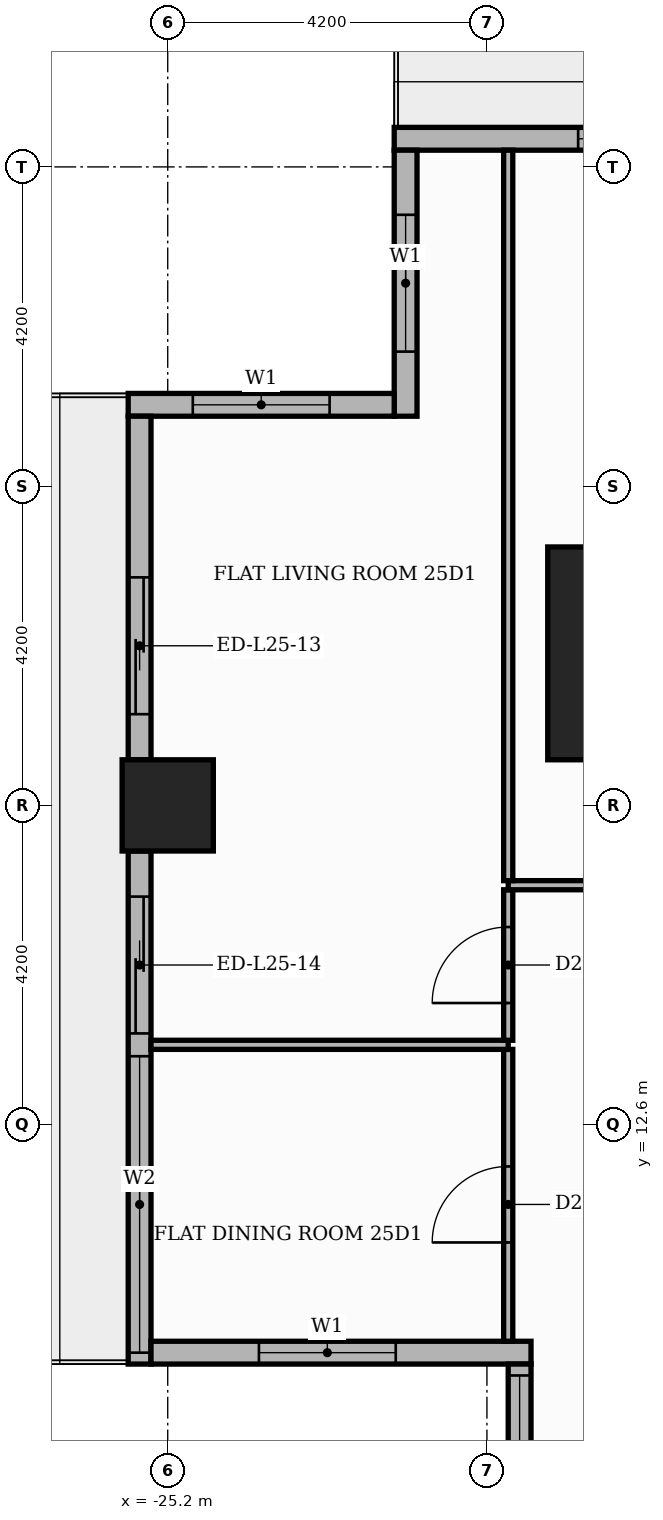
"""IFC4 building model, lengths in metres.
Left out: names, types, materials, properties, quantities, classifications, styles, units other than length and angle.
Written with IfcOpenShell. Run it as: python <this file> out.ifc"""

import sys

from ifc_helpers import new_model, si_unit, direction, frame, frame_2d, origin, origin_2d, place, context, subcontext, project, spatial, rectangle, extrude, element, fill, save


model = new_model("IFC4")
c1 = context("Model", 3, precision=1e-05, world=origin(), true_north=direction((0.0, 1.0)))
c2 = subcontext(c1, "Body", "Model", "MODEL_VIEW")
j1 = project(units=[si_unit("LENGTHUNIT", "METRE"), si_unit("PLANEANGLEUNIT", "RADIAN")], contexts=[c1])
p1 = place(None, origin())
s1 = spatial("IfcSite", under=j1, at=p1, CompositionType="ELEMENT")
p2 = place(p1, origin())
s2 = spatial("IfcBuilding", under=s1, at=p2, CompositionType="ELEMENT")
p3 = place(p2, frame((0.0, 0.0, 106.5)))
s3 = spatial("IfcBuildingStorey", under=s2, at=p3, CompositionType="ELEMENT", Elevation=106.5)
p4 = place(p3, frame((-18.8, 18.8, 0.0), z_axis=(0.0, 0.0, 1.0), x_axis=(1.0, 0.0, 0.0)))
e1 = element("IfcColumn", 1, at=p4, inside=s3, PredefinedType="COLUMN", context=c2, shape_type="SweptSolid", body=[
    extrude(rectangle(XDim=2.8, YDim=2.8, at=origin_2d()), origin(), (0.0, 0.0, 1.0), 3.9),
])
p5 = place(p3, frame((-25.2, 16.8, 0.0), z_axis=(0.0, 0.0, 1.0), x_axis=(1.0, 0.0, 0.0)))
e2 = element("IfcColumn", 2, at=p5, inside=s3, PredefinedType="COLUMN", context=c2, shape_type="SweptSolid", body=[
    extrude(rectangle(XDim=1.2, YDim=1.2, at=origin_2d()), origin(), (0.0, 0.0, 1.0), 3.9),
])
p6 = place(p3, frame((-17.4, 25.57, 0.0), z_axis=(0.0, 0.0, 1.0), x_axis=(-1.0, 0.0, 0.0)))
e3 = element("IfcWall", 3, at=p6, inside=s3, PredefinedType="STANDARD", context=c2, shape_type="SweptSolid", body=[
    extrude(rectangle(XDim=4.82, YDim=0.3, at=frame_2d((2.41, 0.0))), origin(), (0.0, 0.0, 1.0), 3.48),
])
p7 = place(p6, frame((0.6, 0.0, 0.9)))
e4 = element("IfcOpeningElement", 4, at=p7, cuts=e3, PredefinedType="OPENING", context=c2, shape_type="SweptSolid", body=[
    extrude(rectangle(XDim=1.8, YDim=2.1, at=frame_2d((0.9, 1.05))), frame((0.0, 0.16, 0.0), z_axis=(0.0, -1.0, 0.0), x_axis=(1.0, 0.0, 0.0)), (0.0, 0.0, 1.0), 0.32),
])
p8 = place(p3, frame((-22.07, 25.42, 0.0), z_axis=(0.0, 0.0, 1.0), x_axis=(0.0, -1.0, 0.0)))
e5 = element("IfcWall", 5, at=p8, inside=s3, PredefinedType="STANDARD", context=c2, shape_type="SweptSolid", body=[
    extrude(rectangle(XDim=3.5, YDim=0.3, at=frame_2d((1.75, 0.0))), origin(), (0.0, 0.0, 1.0), 3.48),
])
p9 = place(p8, frame((0.85, 0.0, 0.9)))
e6 = element("IfcOpeningElement", 6, at=p9, cuts=e5, PredefinedType="OPENING", context=c2, shape_type="SweptSolid", body=[
    extrude(rectangle(XDim=1.8, YDim=2.1, at=frame_2d((0.9, 1.05))), frame((0.0, 0.16, 0.0), z_axis=(0.0, -1.0, 0.0), x_axis=(1.0, 0.0, 0.0)), (0.0, 0.0, 1.0), 0.32),
])
p10 = place(p3, frame((-22.22, 22.07, 0.0), z_axis=(0.0, 0.0, 1.0), x_axis=(-1.0, 0.0, 0.0)))
e7 = element("IfcWall", 7, at=p10, inside=s3, PredefinedType="STANDARD", context=c2, shape_type="SweptSolid", body=[
    extrude(rectangle(XDim=3.5, YDim=0.3, at=frame_2d((1.75, 0.0))), origin(), (0.0, 0.0, 1.0), 3.48),
])
p11 = place(p10, frame((0.85, 0.0, 0.9)))
e8 = element("IfcOpeningElement", 8, at=p11, cuts=e7, PredefinedType="OPENING", context=c2, shape_type="SweptSolid", body=[
    extrude(rectangle(XDim=1.8, YDim=2.1, at=frame_2d((0.9, 1.05))), frame((0.0, 0.16, 0.0), z_axis=(0.0, -1.0, 0.0), x_axis=(1.0, 0.0, 0.0)), (0.0, 0.0, 1.0), 0.32),
])
p12 = place(p3, frame((-25.57, 21.92, 0.0), z_axis=(0.0, 0.0, 1.0), x_axis=(0.0, -1.0, 0.0)))
e9 = element("IfcWall", 9, at=p12, inside=s3, PredefinedType="STANDARD", context=c2, shape_type="SweptSolid", body=[
    extrude(rectangle(XDim=4.52, YDim=0.3, at=frame_2d((2.26, 0.0))), origin(), (0.0, 0.0, 1.0), 3.48),
])
p13 = place(p12, frame((2.12, 0.0, 0.0)))
e10 = element("IfcOpeningElement", 10, at=p13, cuts=e9, PredefinedType="OPENING", context=c2, shape_type="SweptSolid", body=[
    extrude(rectangle(XDim=1.8, YDim=2.4, at=frame_2d((0.9, 1.2))), frame((0.0, 0.16, 0.0), z_axis=(0.0, -1.0, 0.0), x_axis=(1.0, 0.0, 0.0)), (0.0, 0.0, 1.0), 0.32),
])
p14 = place(p3, frame((-25.57, 16.2, 0.0), z_axis=(0.0, 0.0, 1.0), x_axis=(0.0, -1.0, 0.0)))
e11 = element("IfcWall", 11, at=p14, inside=s3, PredefinedType="STANDARD", context=c2, shape_type="SweptSolid", body=[
    extrude(rectangle(XDim=6.75, YDim=0.3, at=frame_2d((3.375, 0.0))), origin(), (0.0, 0.0, 1.0), 3.48),
])
p15 = place(p14, frame((0.6, 0.0, 0.0)))
e12 = element("IfcOpeningElement", 12, at=p15, cuts=e11, PredefinedType="OPENING", context=c2, shape_type="SweptSolid", body=[
    extrude(rectangle(XDim=1.8, YDim=2.4, at=frame_2d((0.9, 1.2))), frame((0.0, 0.16, 0.0), z_axis=(0.0, -1.0, 0.0), x_axis=(1.0, 0.0, 0.0)), (0.0, 0.0, 1.0), 0.32),
])
p16 = place(p14, frame((2.7, 0.0, 0.9)))
e13 = element("IfcOpeningElement", 13, at=p16, cuts=e11, PredefinedType="OPENING", context=c2, shape_type="SweptSolid", body=[
    extrude(rectangle(XDim=3.9, YDim=2.1, at=frame_2d((1.95, 1.05))), frame((0.0, 0.16, 0.0), z_axis=(0.0, -1.0, 0.0), x_axis=(1.0, 0.0, 0.0)), (0.0, 0.0, 1.0), 0.32),
])
p17 = place(p3, frame((-25.42, 9.6, 0.0), z_axis=(0.0, 0.0, 1.0), x_axis=(1.0, 0.0, 0.0)))
e14 = element("IfcWall", 14, at=p17, inside=s3, PredefinedType="STANDARD", context=c2, shape_type="SweptSolid", body=[
    extrude(rectangle(XDim=5.0, YDim=0.3, at=frame_2d((2.5, 0.0))), origin(), (0.0, 0.0, 1.0), 3.48),
])
p18 = place(p17, frame((1.42, 0.0, 0.9)))
e15 = element("IfcOpeningElement", 15, at=p18, cuts=e14, PredefinedType="OPENING", context=c2, shape_type="SweptSolid", body=[
    extrude(rectangle(XDim=1.8, YDim=2.1, at=frame_2d((0.9, 1.05))), frame((0.0, 0.16, 0.0), z_axis=(0.0, -1.0, 0.0), x_axis=(1.0, 0.0, 0.0)), (0.0, 0.0, 1.0), 0.32),
])
p19 = place(p3, frame((-20.57, 9.45, 0.0), z_axis=(0.0, 0.0, 1.0), x_axis=(0.0, -1.0, 0.0)))
e16 = element("IfcWall", 16, at=p19, inside=s3, PredefinedType="STANDARD", context=c2, shape_type="SweptSolid", body=[
    extrude(rectangle(XDim=19.2, YDim=0.3, at=frame_2d((9.6, 0.0))), origin(), (0.0, 0.0, 1.0), 3.48),
])
p20 = place(p19, frame((0.15, 0.0, 0.9)))
e17 = element("IfcOpeningElement", 17, at=p20, cuts=e16, PredefinedType="OPENING", context=c2, shape_type="SweptSolid", body=[
    extrude(rectangle(XDim=6.0, YDim=2.1, at=frame_2d((3.0, 1.05))), frame((0.0, 0.16, 0.0), z_axis=(0.0, -1.0, 0.0), x_axis=(1.0, 0.0, 0.0)), (0.0, 0.0, 1.0), 0.32),
])
p21 = place(p19, frame((6.45, 0.0, 0.9)))
e18 = element("IfcOpeningElement", 18, at=p21, cuts=e16, PredefinedType="OPENING", context=c2, shape_type="SweptSolid", body=[
    extrude(rectangle(XDim=6.0, YDim=2.1, at=frame_2d((3.0, 1.05))), frame((0.0, 0.16, 0.0), z_axis=(0.0, -1.0, 0.0), x_axis=(1.0, 0.0, 0.0)), (0.0, 0.0, 1.0), 0.32),
])
p22 = place(p19, frame((12.75, 0.0, 0.9)))
e19 = element("IfcOpeningElement", 19, at=p22, cuts=e16, PredefinedType="OPENING", context=c2, shape_type="SweptSolid", body=[
    extrude(rectangle(XDim=6.0, YDim=2.1, at=frame_2d((3.0, 1.05))), frame((0.0, 0.16, 0.0), z_axis=(0.0, -1.0, 0.0), x_axis=(1.0, 0.0, 0.0)), (0.0, 0.0, 1.0), 0.32),
])
p23 = place(p3, frame((-20.72, 9.75, 0.0), z_axis=(0.0, 0.0, 1.0), x_axis=(0.0, 1.0, 0.0)))
e20 = element("IfcWall", 20, at=p23, inside=s3, PredefinedType="PARTITIONING", context=c2, shape_type="SweptSolid", body=[
    extrude(rectangle(XDim=3.84, YDim=0.12, at=frame_2d((1.92, 0.0))), origin(), (0.0, 0.0, 1.0), 3.48),
])
p24 = place(p23, frame((1.3, 0.0, 0.0)))
e21 = element("IfcOpeningElement", 21, at=p24, cuts=e20, PredefinedType="OPENING", context=c2, shape_type="SweptSolid", body=[
    extrude(rectangle(XDim=1.0, YDim=2.1, at=frame_2d((0.5, 1.05))), frame((0.0, 0.07, 0.0), z_axis=(0.0, -1.0, 0.0), x_axis=(1.0, 0.0, 0.0)), (0.0, 0.0, 1.0), 0.14),
])
p25 = place(p3, frame((-25.42, 13.65, 0.0), z_axis=(0.0, 0.0, 1.0), x_axis=(1.0, 0.0, 0.0)))
e22 = element("IfcWall", 22, at=p25, inside=s3, PredefinedType="PARTITIONING", context=c2, shape_type="SweptSolid", body=[
    extrude(rectangle(XDim=4.7, YDim=0.12, at=frame_2d((2.35, 0.0))), origin(), (0.0, 0.0, 1.0), 3.48),
])
p26 = place(p3, frame((-20.72, 13.71, 0.0), z_axis=(0.0, 0.0, 1.0), x_axis=(0.0, 1.0, 0.0)))
e23 = element("IfcWall", 23, at=p26, inside=s3, PredefinedType="PARTITIONING", context=c2, shape_type="SweptSolid", body=[
    extrude(rectangle(XDim=1.98, YDim=0.12, at=frame_2d((0.99, 0.0))), origin(), (0.0, 0.0, 1.0), 3.48),
])
p27 = place(p26, frame((0.49, 0.0, 0.0)))
e24 = element("IfcOpeningElement", 24, at=p27, cuts=e23, PredefinedType="OPENING", context=c2, shape_type="SweptSolid", body=[
    extrude(rectangle(XDim=1.0, YDim=2.1, at=frame_2d((0.5, 1.05))), frame((0.0, 0.07, 0.0), z_axis=(0.0, -1.0, 0.0), x_axis=(1.0, 0.0, 0.0)), (0.0, 0.0, 1.0), 0.14),
])
p28 = place(p3, frame((-20.72, 15.75, 0.0), z_axis=(0.0, 0.0, 1.0), x_axis=(1.0, 0.0, 0.0)))
e25 = element("IfcWall", 25, at=p28, inside=s3, PredefinedType="PARTITIONING", context=c2, shape_type="SweptSolid", body=[
    extrude(rectangle(XDim=6.97, YDim=0.12, at=frame_2d((3.485, 0.0))), origin(), (0.0, 0.0, 1.0), 3.48),
])
p29 = place(p28, frame((3.085, 0.0, 0.0)))
e26 = element("IfcOpeningElement", 26, at=p29, cuts=e25, PredefinedType="OPENING", context=c2, shape_type="SweptSolid", body=[
    extrude(rectangle(XDim=0.9, YDim=2.1, at=frame_2d((0.45, 1.05))), frame((0.0, 0.07, 0.0), z_axis=(0.0, -1.0, 0.0), x_axis=(1.0, 0.0, 0.0)), (0.0, 0.0, 1.0), 0.14),
])
p30 = place(p3, frame((-20.72, 15.81, 0.0), z_axis=(0.0, 0.0, 1.0), x_axis=(0.0, 1.0, 0.0)))
e27 = element("IfcWall", 27, at=p30, inside=s3, PredefinedType="PARTITIONING", context=c2, shape_type="SweptSolid", body=[
    extrude(rectangle(XDim=9.61, YDim=0.12, at=frame_2d((4.805, 0.0))), origin(), (0.0, 0.0, 1.0), 3.48),
])
p31 = place(p7, origin())
e28 = element("IfcWindow", 28, at=p31, inside=s3, PartitioningType="SINGLE_PANEL", PredefinedType="WINDOW", context=c2, shape_type="SweptSolid", body=[
    extrude(rectangle(XDim=1.8, YDim=2.1, at=frame_2d((0.9, 1.05))), frame((0.0, 0.03, 0.0), z_axis=(0.0, -1.0, 0.0), x_axis=(1.0, 0.0, 0.0)), (0.0, 0.0, 1.0), 0.06),
])
fill(e4, e28)
p32 = place(p9, origin())
e29 = element("IfcWindow", 29, at=p32, inside=s3, PartitioningType="SINGLE_PANEL", PredefinedType="WINDOW", context=c2, shape_type="SweptSolid", body=[
    extrude(rectangle(XDim=1.8, YDim=2.1, at=frame_2d((0.9, 1.05))), frame((0.0, 0.03, 0.0), z_axis=(0.0, -1.0, 0.0), x_axis=(1.0, 0.0, 0.0)), (0.0, 0.0, 1.0), 0.06),
])
fill(e6, e29)
p33 = place(p11, origin())
e30 = element("IfcWindow", 30, at=p33, inside=s3, PartitioningType="SINGLE_PANEL", PredefinedType="WINDOW", context=c2, shape_type="SweptSolid", body=[
    extrude(rectangle(XDim=1.8, YDim=2.1, at=frame_2d((0.9, 1.05))), frame((0.0, 0.03, 0.0), z_axis=(0.0, -1.0, 0.0), x_axis=(1.0, 0.0, 0.0)), (0.0, 0.0, 1.0), 0.06),
])
fill(e8, e30)
p34 = place(p13, origin())
e31 = element("IfcDoor", 31, at=p34, inside=s3, OperationType="SLIDING_TO_RIGHT", PredefinedType="DOOR", context=c2, shape_type="SweptSolid", body=[
    extrude(rectangle(XDim=1.8, YDim=2.4, at=frame_2d((0.9, 1.2))), frame((0.0, 0.025, 0.0), z_axis=(0.0, -1.0, 0.0), x_axis=(1.0, 0.0, 0.0)), (0.0, 0.0, 1.0), 0.05),
])
fill(e10, e31)
p35 = place(p15, origin())
e32 = element("IfcDoor", 32, at=p35, inside=s3, OperationType="SLIDING_TO_LEFT", PredefinedType="DOOR", context=c2, shape_type="SweptSolid", body=[
    extrude(rectangle(XDim=1.8, YDim=2.4, at=frame_2d((0.9, 1.2))), frame((0.0, 0.025, 0.0), z_axis=(0.0, -1.0, 0.0), x_axis=(1.0, 0.0, 0.0)), (0.0, 0.0, 1.0), 0.05),
])
fill(e12, e32)
p36 = place(p16, origin())
e33 = element("IfcWindow", 33, at=p36, inside=s3, PartitioningType="SINGLE_PANEL", PredefinedType="WINDOW", context=c2, shape_type="SweptSolid", body=[
    extrude(rectangle(XDim=3.9, YDim=2.1, at=frame_2d((1.95, 1.05))), frame((0.0, 0.03, 0.0), z_axis=(0.0, -1.0, 0.0), x_axis=(1.0, 0.0, 0.0)), (0.0, 0.0, 1.0), 0.06),
])
fill(e13, e33)
p37 = place(p18, origin())
e34 = element("IfcWindow", 34, at=p37, inside=s3, PartitioningType="SINGLE_PANEL", PredefinedType="WINDOW", context=c2, shape_type="SweptSolid", body=[
    extrude(rectangle(XDim=1.8, YDim=2.1, at=frame_2d((0.9, 1.05))), frame((0.0, 0.03, 0.0), z_axis=(0.0, -1.0, 0.0), x_axis=(1.0, 0.0, 0.0)), (0.0, 0.0, 1.0), 0.06),
])
fill(e15, e34)
p38 = place(p20, origin())
e35 = element("IfcWindow", 35, at=p38, inside=s3, PartitioningType="SINGLE_PANEL", PredefinedType="WINDOW", context=c2, shape_type="SweptSolid", body=[
    extrude(rectangle(XDim=6.0, YDim=2.1, at=frame_2d((3.0, 1.05))), frame((0.0, 0.03, 0.0), z_axis=(0.0, -1.0, 0.0), x_axis=(1.0, 0.0, 0.0)), (0.0, 0.0, 1.0), 0.06),
])
fill(e17, e35)
p39 = place(p27, origin())
e36 = element("IfcDoor", 36, at=p39, inside=s3, OperationType="SINGLE_SWING_LEFT", PredefinedType="DOOR", context=c2, shape_type="SweptSolid", body=[
    extrude(rectangle(XDim=1.0, YDim=2.1, at=frame_2d((0.5, 1.05))), frame((0.0, 0.025, 0.0), z_axis=(0.0, -1.0, 0.0), x_axis=(1.0, 0.0, 0.0)), (0.0, 0.0, 1.0), 0.05),
])
fill(e24, e36)
p40 = place(p24, origin())
e37 = element("IfcDoor", 37, at=p40, inside=s3, OperationType="SINGLE_SWING_LEFT", PredefinedType="DOOR", context=c2, shape_type="SweptSolid", body=[
    extrude(rectangle(XDim=1.0, YDim=2.1, at=frame_2d((0.5, 1.05))), frame((0.0, 0.025, 0.0), z_axis=(0.0, -1.0, 0.0), x_axis=(1.0, 0.0, 0.0)), (0.0, 0.0, 1.0), 0.05),
])
fill(e21, e37)
save(model, sys.argv[1])
